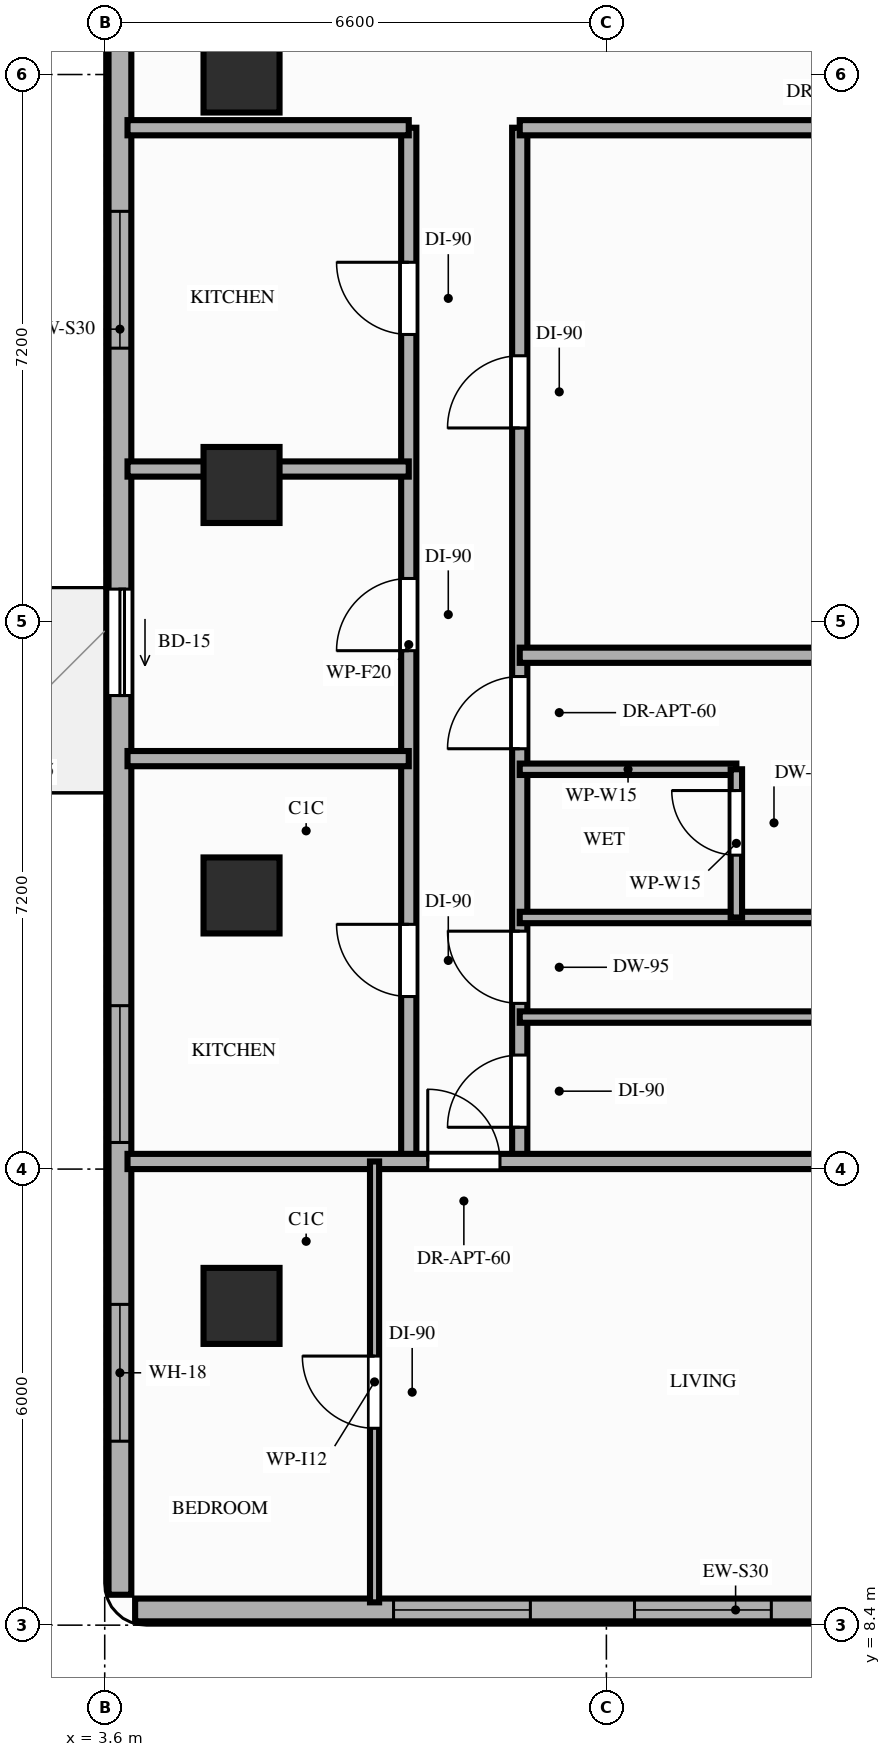
"""IFC4 building model, lengths in metres.
Left out: names, types, materials, properties, quantities, classifications, styles, units other than length and angle.
Written with IfcOpenShell. Run it as: python <this file> out.ifc"""

import sys

from ifc_helpers import new_model, si_unit, direction, frame, frame_2d, origin, origin_2d, place, context, subcontext, project, spatial, rectangle, extrude, element, fill, save


model = new_model("IFC4")
c1 = context("Model", 3, precision=1e-05, world=origin(), true_north=direction((0.0, 1.0)))
c2 = subcontext(c1, "Body", "Model", "MODEL_VIEW")
j1 = project(units=[si_unit("LENGTHUNIT", "METRE"), si_unit("PLANEANGLEUNIT", "RADIAN")], contexts=[c1])
p1 = place(None, origin())
s1 = spatial("IfcSite", under=j1, at=p1, CompositionType="ELEMENT")
p2 = place(p1, origin())
s2 = spatial("IfcBuilding", under=s1, at=p2, CompositionType="ELEMENT")
p3 = place(p2, frame((0.0, 0.0, 139.4)))
s3 = spatial("IfcBuildingStorey", under=s2, at=p3, CompositionType="ELEMENT", Elevation=139.4)
for number, where, z_axis, x_axis in (
    (1, (5.4, 12.6, 0.0), (0.0, 0.0, 1.0), (1.0, 0.0, 0.0)),
    (2, (5.4, 18.0, 0.0), (0.0, 0.0, 1.0), (1.0, 0.0, 0.0)),
    (3, (5.4, 23.4, 0.0), (0.0, 0.0, 1.0), (1.0, 0.0, 0.0)),
    (4, (5.4, 28.8, 0.0), (0.0, 0.0, 1.0), (1.0, 0.0, 0.0)),
):
    element("IfcColumn", number, at=place(p3, frame(where, z_axis=z_axis, x_axis=x_axis)), inside=s3, PredefinedType="COLUMN", context=c2, shape_type="SweptSolid", body=[
        extrude(rectangle(XDim=1.0, YDim=1.0, at=origin_2d()), origin(), (0.0, 0.0, 1.0), 3.2),
    ])
p4 = place(p3, frame((4.0, 8.6, 0.0), z_axis=(0.0, 0.0, 1.0), x_axis=(1.0, 0.0, 0.0)))
e5 = element("IfcWall", 5, at=p4, inside=s3, PredefinedType="STANDARD", context=c2, shape_type="SweptSolid", body=[
    extrude(rectangle(XDim=15.8, YDim=0.3, at=frame_2d((7.9, 0.0))), origin(), (0.0, 0.0, 1.0), 3.02),
])
p5 = place(p4, frame((6.57, 0.0, 0.85)))
e6 = element("IfcOpeningElement", 6, at=p5, cuts=e5, PredefinedType="OPENING", context=c2, shape_type="SweptSolid", body=[
    extrude(rectangle(XDim=1.8, YDim=1.75, at=frame_2d((0.9, 0.875))), frame((0.0, 0.16, 0.0), z_axis=(0.0, -1.0, 0.0), x_axis=(1.0, 0.0, 0.0)), (0.0, 0.0, 1.0), 0.32),
])
p6 = place(p4, frame((3.4, 0.0, 0.85)))
e7 = element("IfcOpeningElement", 7, at=p6, cuts=e5, PredefinedType="OPENING", context=c2, shape_type="SweptSolid", body=[
    extrude(rectangle(XDim=1.8, YDim=1.75, at=frame_2d((0.9, 0.875))), frame((0.0, 0.16, 0.0), z_axis=(0.0, -1.0, 0.0), x_axis=(1.0, 0.0, 0.0)), (0.0, 0.0, 1.0), 0.32),
])
p7 = place(p3, frame((3.8, 42.1, 0.0), z_axis=(0.0, 0.0, 1.0), x_axis=(0.0, -1.0, 0.0)))
e8 = element("IfcWall", 8, at=p7, inside=s3, PredefinedType="STANDARD", context=c2, shape_type="SweptSolid", body=[
    extrude(rectangle(XDim=33.3, YDim=0.3, at=frame_2d((16.65, 0.0))), origin(), (0.0, 0.0, 1.0), 2.71),
])
p8 = place(p7, frame((20.07, 0.0, 0.0)))
e9 = element("IfcOpeningElement", 9, at=p8, cuts=e8, PredefinedType="OPENING", context=c2, shape_type="SweptSolid", body=[
    extrude(rectangle(XDim=1.4, YDim=2.1, at=frame_2d((0.7, 1.05))), frame((0.0, 0.16, 0.0), z_axis=(0.0, -1.0, 0.0), x_axis=(1.0, 0.0, 0.0)), (0.0, 0.0, 1.0), 0.32),
])
p9 = place(p7, frame((29.48, 0.0, 0.85)))
e10 = element("IfcOpeningElement", 10, at=p9, cuts=e8, PredefinedType="OPENING", context=c2, shape_type="SweptSolid", body=[
    extrude(rectangle(XDim=1.8, YDim=1.61, at=frame_2d((0.9, 0.805))), frame((0.0, 0.16, 0.0), z_axis=(0.0, -1.0, 0.0), x_axis=(1.0, 0.0, 0.0)), (0.0, 0.0, 1.0), 0.32),
])
p10 = place(p7, frame((25.55, 0.0, 0.85)))
e11 = element("IfcOpeningElement", 11, at=p10, cuts=e8, PredefinedType="OPENING", context=c2, shape_type="SweptSolid", body=[
    extrude(rectangle(XDim=1.8, YDim=1.61, at=frame_2d((0.9, 0.805))), frame((0.0, 0.16, 0.0), z_axis=(0.0, -1.0, 0.0), x_axis=(1.0, 0.0, 0.0)), (0.0, 0.0, 1.0), 0.32),
])
p11 = place(p7, frame((15.1, 0.0, 0.85)))
e12 = element("IfcOpeningElement", 12, at=p11, cuts=e8, PredefinedType="OPENING", context=c2, shape_type="SweptSolid", body=[
    extrude(rectangle(XDim=1.8, YDim=1.61, at=frame_2d((0.9, 0.805))), frame((0.0, 0.16, 0.0), z_axis=(0.0, -1.0, 0.0), x_axis=(1.0, 0.0, 0.0)), (0.0, 0.0, 1.0), 0.32),
])
p12 = place(p7, frame((9.9, 0.0, 0.85)))
e13 = element("IfcOpeningElement", 13, at=p12, cuts=e8, PredefinedType="OPENING", context=c2, shape_type="SweptSolid", body=[
    extrude(rectangle(XDim=1.8, YDim=1.61, at=frame_2d((0.9, 0.805))), frame((0.0, 0.16, 0.0), z_axis=(0.0, -1.0, 0.0), x_axis=(1.0, 0.0, 0.0)), (0.0, 0.0, 1.0), 0.32),
])
p13 = place(p7, frame((3.8, 0.0, 0.85)))
e14 = element("IfcOpeningElement", 14, at=p13, cuts=e8, PredefinedType="OPENING", context=c2, shape_type="SweptSolid", body=[
    extrude(rectangle(XDim=1.8, YDim=1.61, at=frame_2d((0.9, 0.805))), frame((0.0, 0.16, 0.0), z_axis=(0.0, -1.0, 0.0), x_axis=(1.0, 0.0, 0.0)), (0.0, 0.0, 1.0), 0.32),
])
p14 = place(p3, frame((7.6, 14.5, 0.0), z_axis=(0.0, 0.0, 1.0), x_axis=(0.0, 1.0, 0.0)))
e15 = element("IfcWall", 15, at=p14, inside=s3, PredefinedType="PARTITIONING", context=c2, shape_type="SweptSolid", body=[
    extrude(rectangle(XDim=13.6, YDim=0.2, at=frame_2d((6.8, 0.0))), origin(), (0.0, 0.0, 1.0), 2.45),
])
p15 = place(p14, frame((2.17, 0.0, 0.0)))
e16 = element("IfcOpeningElement", 16, at=p15, cuts=e15, PredefinedType="OPENING", context=c2, shape_type="SweptSolid", body=[
    extrude(rectangle(XDim=0.95, YDim=2.15, at=frame_2d((0.475, 1.075))), frame((0.0, 0.11, 0.0), z_axis=(0.0, -1.0, 0.0), x_axis=(1.0, 0.0, 0.0)), (0.0, 0.0, 1.0), 0.22),
])
p16 = place(p14, frame((6.72, 0.0, 0.0)))
e17 = element("IfcOpeningElement", 17, at=p16, cuts=e15, PredefinedType="OPENING", context=c2, shape_type="SweptSolid", body=[
    extrude(rectangle(XDim=0.95, YDim=2.15, at=frame_2d((0.475, 1.075))), frame((0.0, 0.11, 0.0), z_axis=(0.0, -1.0, 0.0), x_axis=(1.0, 0.0, 0.0)), (0.0, 0.0, 1.0), 0.22),
])
p17 = place(p14, frame((10.88, 0.0, 0.0)))
e18 = element("IfcOpeningElement", 18, at=p17, cuts=e15, PredefinedType="OPENING", context=c2, shape_type="SweptSolid", body=[
    extrude(rectangle(XDim=0.95, YDim=2.15, at=frame_2d((0.475, 1.075))), frame((0.0, 0.11, 0.0), z_axis=(0.0, -1.0, 0.0), x_axis=(1.0, 0.0, 0.0)), (0.0, 0.0, 1.0), 0.22),
])
p18 = place(p3, frame((9.06, 14.5, 0.0), z_axis=(0.0, 0.0, 1.0), x_axis=(0.0, 1.0, 0.0)))
e19 = element("IfcWall", 19, at=p18, inside=s3, PredefinedType="PARTITIONING", context=c2, shape_type="SweptSolid", body=[
    extrude(rectangle(XDim=13.6, YDim=0.2, at=frame_2d((6.8, 0.0))), origin(), (0.0, 0.0, 1.0), 2.45),
])
p19 = place(p18, frame((0.45, 0.0, 0.0)))
e20 = element("IfcOpeningElement", 20, at=p19, cuts=e19, PredefinedType="OPENING", context=c2, shape_type="SweptSolid", body=[
    extrude(rectangle(XDim=0.95, YDim=2.15, at=frame_2d((0.475, 1.075))), frame((0.0, 0.11, 0.0), z_axis=(0.0, -1.0, 0.0), x_axis=(1.0, 0.0, 0.0)), (0.0, 0.0, 1.0), 0.22),
])
p20 = place(p18, frame((2.08, 0.0, 0.0)))
e21 = element("IfcOpeningElement", 21, at=p20, cuts=e19, PredefinedType="OPENING", context=c2, shape_type="SweptSolid", body=[
    extrude(rectangle(XDim=0.95, YDim=2.1, at=frame_2d((0.475, 1.05))), frame((0.0, 0.11, 0.0), z_axis=(0.0, -1.0, 0.0), x_axis=(1.0, 0.0, 0.0)), (0.0, 0.0, 1.0), 0.22),
])
p21 = place(p18, frame((9.65, 0.0, 0.0)))
e22 = element("IfcOpeningElement", 22, at=p21, cuts=e19, PredefinedType="OPENING", context=c2, shape_type="SweptSolid", body=[
    extrude(rectangle(XDim=0.95, YDim=2.15, at=frame_2d((0.475, 1.075))), frame((0.0, 0.11, 0.0), z_axis=(0.0, -1.0, 0.0), x_axis=(1.0, 0.0, 0.0)), (0.0, 0.0, 1.0), 0.22),
])
p22 = place(p18, frame((5.43, 0.0, 0.0)))
e23 = element("IfcOpeningElement", 23, at=p22, cuts=e19, PredefinedType="OPENING", context=c2, shape_type="SweptSolid", body=[
    extrude(rectangle(XDim=0.95, YDim=2.15, at=frame_2d((0.475, 1.075))), frame((0.0, 0.11, 0.0), z_axis=(0.0, -1.0, 0.0), x_axis=(1.0, 0.0, 0.0)), (0.0, 0.0, 1.0), 0.22),
])
p23 = place(p3, frame((3.9, 14.5, 0.0), z_axis=(0.0, 0.0, 1.0), x_axis=(1.0, 0.0, 0.0)))
e24 = element("IfcWall", 24, at=p23, inside=s3, PredefinedType="PARTITIONING", context=c2, shape_type="SweptSolid", body=[
    extrude(rectangle(XDim=16.0, YDim=0.2, at=frame_2d((8.0, 0.0))), origin(), (0.0, 0.0, 1.0), 2.45),
])
p24 = place(p23, frame((3.95, 0.0, 0.0)))
e25 = element("IfcOpeningElement", 25, at=p24, cuts=e24, PredefinedType="OPENING", context=c2, shape_type="SweptSolid", body=[
    extrude(rectangle(XDim=0.95, YDim=2.15, at=frame_2d((0.475, 1.075))), frame((0.0, 0.11, 0.0), z_axis=(0.0, -1.0, 0.0), x_axis=(1.0, 0.0, 0.0)), (0.0, 0.0, 1.0), 0.22),
])
p25 = place(p3, frame((3.9, 28.1, 0.0), z_axis=(0.0, 0.0, 1.0), x_axis=(1.0, 0.0, 0.0)))
e26 = element("IfcWall", 26, at=p25, inside=s3, PredefinedType="PARTITIONING", context=c2, shape_type="SweptSolid", body=[
    extrude(rectangle(XDim=3.7, YDim=0.2, at=frame_2d((1.85, 0.0))), origin(), (0.0, 0.0, 1.0), 2.45),
])
p26 = place(p3, frame((9.06, 28.1, 0.0), z_axis=(0.0, 0.0, 1.0), x_axis=(1.0, 0.0, 0.0)))
e27 = element("IfcWall", 27, at=p26, inside=s3, PredefinedType="PARTITIONING", context=c2, shape_type="SweptSolid", body=[
    extrude(rectangle(XDim=10.84, YDim=0.2, at=frame_2d((5.42, 0.0))), origin(), (0.0, 0.0, 1.0), 2.45),
])
for number, where, z_axis, x_axis in (
    (28, (3.9, 19.8, 0.0), (0.0, 0.0, 1.0), (1.0, 0.0, 0.0)),
    (29, (3.9, 23.61, 0.0), (0.0, 0.0, 1.0), (1.0, 0.0, 0.0)),
):
    element("IfcWall", number, at=place(p3, frame(where, z_axis=z_axis, x_axis=x_axis)), inside=s3, PredefinedType="PARTITIONING", context=c2, shape_type="SweptSolid", body=[
        extrude(rectangle(XDim=3.7, YDim=0.2, at=frame_2d((1.85, 0.0))), origin(), (0.0, 0.0, 1.0), 2.45),
    ])
p27 = place(p3, frame((7.15, 8.7, 0.0), z_axis=(0.0, 0.0, 1.0), x_axis=(0.0, 1.0, 0.0)))
e30 = element("IfcWall", 30, at=p27, inside=s3, PredefinedType="PARTITIONING", context=c2, shape_type="SweptSolid", body=[
    extrude(rectangle(XDim=5.8, YDim=0.12, at=frame_2d((2.9, 0.0))), origin(), (0.0, 0.0, 1.0), 2.45),
])
p28 = place(p27, frame((2.29, 0.0, 0.0)))
e31 = element("IfcOpeningElement", 31, at=p28, cuts=e30, PredefinedType="OPENING", context=c2, shape_type="SweptSolid", body=[
    extrude(rectangle(XDim=0.95, YDim=2.15, at=frame_2d((0.475, 1.075))), frame((0.0, 0.07, 0.0), z_axis=(0.0, -1.0, 0.0), x_axis=(1.0, 0.0, 0.0)), (0.0, 0.0, 1.0), 0.14),
])
for number, where, z_axis, x_axis in (
    (32, (9.06, 16.4, 0.0), (0.0, 0.0, 1.0), (1.0, 0.0, 0.0)),
    (33, (9.06, 17.71, 0.0), (0.0, 0.0, 1.0), (1.0, 0.0, 0.0)),
):
    element("IfcWall", number, at=place(p3, frame(where, z_axis=z_axis, x_axis=x_axis)), inside=s3, PredefinedType="PARTITIONING", context=c2, shape_type="SweptSolid", body=[
        extrude(rectangle(XDim=10.84, YDim=0.15, at=frame_2d((5.42, 0.0))), origin(), (0.0, 0.0, 1.0), 2.45),
    ])
p29 = place(p3, frame((9.06, 21.16, 0.0), z_axis=(0.0, 0.0, 1.0), x_axis=(1.0, 0.0, 0.0)))
e34 = element("IfcWall", 34, at=p29, inside=s3, PredefinedType="PARTITIONING", context=c2, shape_type="SweptSolid", body=[
    extrude(rectangle(XDim=10.84, YDim=0.2, at=frame_2d((5.42, 0.0))), origin(), (0.0, 0.0, 1.0), 2.45),
])
p30 = place(p3, frame((9.06, 19.66, 0.0), z_axis=(0.0, 0.0, 1.0), x_axis=(1.0, 0.0, 0.0)))
e35 = element("IfcWall", 35, at=p30, inside=s3, PredefinedType="PARTITIONING", context=c2, shape_type="SweptSolid", body=[
    extrude(rectangle(XDim=2.85, YDim=0.15, at=frame_2d((1.425, 0.0))), origin(), (0.0, 0.0, 1.0), 2.61),
])
p31 = place(p3, frame((11.91, 17.71, 0.0), z_axis=(0.0, 0.0, 1.0), x_axis=(0.0, 1.0, 0.0)))
e36 = element("IfcWall", 36, at=p31, inside=s3, PredefinedType="PARTITIONING", context=c2, shape_type="SweptSolid", body=[
    extrude(rectangle(XDim=1.95, YDim=0.15, at=frame_2d((0.975, 0.0))), origin(), (0.0, 0.0, 1.0), 2.45),
])
p32 = place(p31, frame((0.82, 0.0, 0.0)))
e37 = element("IfcOpeningElement", 37, at=p32, cuts=e36, PredefinedType="OPENING", context=c2, shape_type="SweptSolid", body=[
    extrude(rectangle(XDim=0.85, YDim=2.1, at=frame_2d((0.425, 1.05))), frame((0.0, 0.085, 0.0), z_axis=(0.0, -1.0, 0.0), x_axis=(1.0, 0.0, 0.0)), (0.0, 0.0, 1.0), 0.17),
])
p33 = place(p8, origin())
e38 = element("IfcDoor", 38, at=p33, inside=s3, OperationType="SLIDING_TO_RIGHT", PredefinedType="DOOR", context=c2, shape_type="SweptSolid", body=[
    extrude(rectangle(XDim=1.4, YDim=2.1, at=frame_2d((0.7, 1.05))), frame((0.0, 0.025, 0.0), z_axis=(0.0, -1.0, 0.0), x_axis=(1.0, 0.0, 0.0)), (0.0, 0.0, 1.0), 0.05),
])
fill(e9, e38)
p34 = place(p9, origin())
e39 = element("IfcWindow", 39, at=p34, inside=s3, PartitioningType="SINGLE_PANEL", PredefinedType="WINDOW", context=c2, shape_type="SweptSolid", body=[
    extrude(rectangle(XDim=1.8, YDim=1.61, at=frame_2d((0.9, 0.805))), frame((0.0, 0.03, 0.0), z_axis=(0.0, -1.0, 0.0), x_axis=(1.0, 0.0, 0.0)), (0.0, 0.0, 1.0), 0.06),
])
fill(e10, e39)
p35 = place(p5, origin())
e40 = element("IfcWindow", 40, at=p35, inside=s3, PartitioningType="SINGLE_PANEL", PredefinedType="WINDOW", context=c2, shape_type="SweptSolid", body=[
    extrude(rectangle(XDim=1.8, YDim=1.75, at=frame_2d((0.9, 0.875))), frame((0.0, 0.03, 0.0), z_axis=(0.0, -1.0, 0.0), x_axis=(1.0, 0.0, 0.0)), (0.0, 0.0, 1.0), 0.06),
])
fill(e6, e40)
p36 = place(p10, origin())
e41 = element("IfcWindow", 41, at=p36, inside=s3, PartitioningType="SINGLE_PANEL", PredefinedType="WINDOW", context=c2, shape_type="SweptSolid", body=[
    extrude(rectangle(XDim=1.8, YDim=1.61, at=frame_2d((0.9, 0.805))), frame((0.0, 0.03, 0.0), z_axis=(0.0, -1.0, 0.0), x_axis=(1.0, 0.0, 0.0)), (0.0, 0.0, 1.0), 0.06),
])
fill(e11, e41)
p37 = place(p11, origin())
e42 = element("IfcWindow", 42, at=p37, inside=s3, PartitioningType="SINGLE_PANEL", PredefinedType="WINDOW", context=c2, shape_type="SweptSolid", body=[
    extrude(rectangle(XDim=1.8, YDim=1.61, at=frame_2d((0.9, 0.805))), frame((0.0, 0.03, 0.0), z_axis=(0.0, -1.0, 0.0), x_axis=(1.0, 0.0, 0.0)), (0.0, 0.0, 1.0), 0.06),
])
fill(e12, e42)
p38 = place(p6, origin())
e43 = element("IfcWindow", 43, at=p38, inside=s3, PartitioningType="SINGLE_PANEL", PredefinedType="WINDOW", context=c2, shape_type="SweptSolid", body=[
    extrude(rectangle(XDim=1.8, YDim=1.75, at=frame_2d((0.9, 0.875))), frame((0.0, 0.03, 0.0), z_axis=(0.0, -1.0, 0.0), x_axis=(1.0, 0.0, 0.0)), (0.0, 0.0, 1.0), 0.06),
])
fill(e7, e43)
p39 = place(p15, origin())
e44 = element("IfcDoor", 44, at=p39, inside=s3, OperationType="SINGLE_SWING_RIGHT", PredefinedType="DOOR", context=c2, shape_type="SweptSolid", body=[
    extrude(rectangle(XDim=0.95, YDim=2.15, at=frame_2d((0.475, 1.075))), frame((0.0, 0.025, 0.0), z_axis=(0.0, -1.0, 0.0), x_axis=(1.0, 0.0, 0.0)), (0.0, 0.0, 1.0), 0.05),
])
fill(e16, e44)
p40 = place(p16, origin())
e45 = element("IfcDoor", 45, at=p40, inside=s3, OperationType="SINGLE_SWING_LEFT", PredefinedType="DOOR", context=c2, shape_type="SweptSolid", body=[
    extrude(rectangle(XDim=0.95, YDim=2.15, at=frame_2d((0.475, 1.075))), frame((0.0, 0.025, 0.0), z_axis=(0.0, -1.0, 0.0), x_axis=(1.0, 0.0, 0.0)), (0.0, 0.0, 1.0), 0.05),
])
fill(e17, e45)
p41 = place(p17, origin())
e46 = element("IfcDoor", 46, at=p41, inside=s3, OperationType="SINGLE_SWING_RIGHT", PredefinedType="DOOR", context=c2, shape_type="SweptSolid", body=[
    extrude(rectangle(XDim=0.95, YDim=2.15, at=frame_2d((0.475, 1.075))), frame((0.0, 0.025, 0.0), z_axis=(0.0, -1.0, 0.0), x_axis=(1.0, 0.0, 0.0)), (0.0, 0.0, 1.0), 0.05),
])
fill(e18, e46)
p42 = place(p24, origin())
e47 = element("IfcDoor", 47, at=p42, inside=s3, OperationType="SINGLE_SWING_LEFT", PredefinedType="DOOR", context=c2, shape_type="SweptSolid", body=[
    extrude(rectangle(XDim=0.95, YDim=2.15, at=frame_2d((0.475, 1.075))), frame((0.0, 0.025, 0.0), z_axis=(0.0, -1.0, 0.0), x_axis=(1.0, 0.0, 0.0)), (0.0, 0.0, 1.0), 0.05),
])
fill(e25, e47)
p43 = place(p28, origin())
e48 = element("IfcDoor", 48, at=p43, inside=s3, OperationType="SINGLE_SWING_RIGHT", PredefinedType="DOOR", context=c2, shape_type="SweptSolid", body=[
    extrude(rectangle(XDim=0.95, YDim=2.15, at=frame_2d((0.475, 1.075))), frame((0.0, 0.025, 0.0), z_axis=(0.0, -1.0, 0.0), x_axis=(1.0, 0.0, 0.0)), (0.0, 0.0, 1.0), 0.05),
])
fill(e31, e48)
p44 = place(p19, origin())
e49 = element("IfcDoor", 49, at=p44, inside=s3, OperationType="SINGLE_SWING_LEFT", PredefinedType="DOOR", context=c2, shape_type="SweptSolid", body=[
    extrude(rectangle(XDim=0.95, YDim=2.15, at=frame_2d((0.475, 1.075))), frame((0.0, 0.025, 0.0), z_axis=(0.0, -1.0, 0.0), x_axis=(1.0, 0.0, 0.0)), (0.0, 0.0, 1.0), 0.05),
])
fill(e20, e49)
p45 = place(p20, origin())
e50 = element("IfcDoor", 50, at=p45, inside=s3, OperationType="SINGLE_SWING_RIGHT", PredefinedType="DOOR", context=c2, shape_type="SweptSolid", body=[
    extrude(rectangle(XDim=0.95, YDim=2.1, at=frame_2d((0.475, 1.05))), frame((0.0, 0.025, 0.0), z_axis=(0.0, -1.0, 0.0), x_axis=(1.0, 0.0, 0.0)), (0.0, 0.0, 1.0), 0.05),
])
fill(e21, e50)
p46 = place(p21, origin())
e51 = element("IfcDoor", 51, at=p46, inside=s3, OperationType="SINGLE_SWING_LEFT", PredefinedType="DOOR", context=c2, shape_type="SweptSolid", body=[
    extrude(rectangle(XDim=0.95, YDim=2.15, at=frame_2d((0.475, 1.075))), frame((0.0, 0.025, 0.0), z_axis=(0.0, -1.0, 0.0), x_axis=(1.0, 0.0, 0.0)), (0.0, 0.0, 1.0), 0.05),
])
fill(e22, e51)
p47 = place(p32, origin())
e52 = element("IfcDoor", 52, at=p47, inside=s3, OperationType="SINGLE_SWING_RIGHT", PredefinedType="DOOR", context=c2, shape_type="SweptSolid", body=[
    extrude(rectangle(XDim=0.85, YDim=2.1, at=frame_2d((0.425, 1.05))), frame((0.0, 0.025, 0.0), z_axis=(0.0, -1.0, 0.0), x_axis=(1.0, 0.0, 0.0)), (0.0, 0.0, 1.0), 0.05),
])
fill(e37, e52)
p48 = place(p22, origin())
e53 = element("IfcDoor", 53, at=p48, inside=s3, OperationType="SINGLE_SWING_LEFT", PredefinedType="DOOR", context=c2, shape_type="SweptSolid", body=[
    extrude(rectangle(XDim=0.95, YDim=2.15, at=frame_2d((0.475, 1.075))), frame((0.0, 0.025, 0.0), z_axis=(0.0, -1.0, 0.0), x_axis=(1.0, 0.0, 0.0)), (0.0, 0.0, 1.0), 0.05),
])
fill(e23, e53)
save(model, sys.argv[1])
